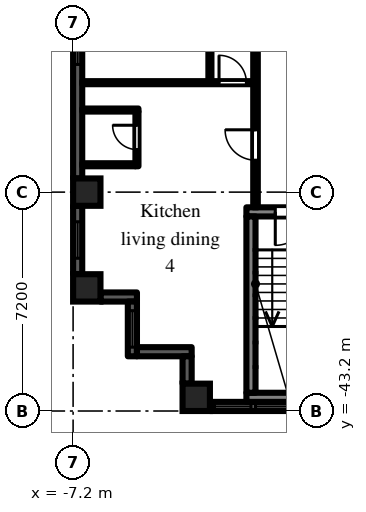
"""IFC4 building model, lengths in metres.
Left out: names, types, materials, properties, quantities, classifications, styles, units other than length and angle.
Written with IfcOpenShell. Run it as: python <this file> out.ifc"""

import sys

from ifc_helpers import new_model, si_unit, direction, frame, frame_2d, origin, origin_2d, place, context, subcontext, project, spatial, rectangle, extrude, element, fill, save


model = new_model("IFC4")
c1 = context("Model", 3, precision=1e-05, world=origin(), true_north=direction((0.0, 1.0)))
c2 = subcontext(c1, "Body", "Model", "MODEL_VIEW")
j1 = project(units=[si_unit("LENGTHUNIT", "METRE"), si_unit("PLANEANGLEUNIT", "RADIAN")], contexts=[c1])
p1 = place(None, origin())
s1 = spatial("IfcSite", under=j1, at=p1, CompositionType="ELEMENT")
p2 = place(p1, origin())
s2 = spatial("IfcBuilding", under=s1, at=p2, CompositionType="ELEMENT")
p3 = place(p2, frame((0.0, 0.0, 29.7)))
s3 = spatial("IfcBuildingStorey", under=s2, at=p3, CompositionType="ELEMENT", Elevation=29.7)
for number, where, z_axis, x_axis in (
    (1, (-6.75, -39.15, 0.0), (0.0, 0.0, 1.0), (1.0, 0.0, 0.0)),
    (2, (-6.75, -36.0, 0.0), (0.0, 0.0, 1.0), (1.0, 0.0, 0.0)),
    (3, (-3.15, -42.75, 0.0), (0.0, 0.0, 1.0), (1.0, 0.0, 0.0)),
):
    element("IfcColumn", number, at=place(p3, frame(where, z_axis=z_axis, x_axis=x_axis)), inside=s3, PredefinedType="COLUMN", context=c2, shape_type="SweptSolid", body=[
        extrude(rectangle(XDim=0.9, YDim=0.9, at=origin_2d()), origin(), (0.0, 0.0, 1.0), 3.0),
    ])
p4 = place(p3, frame((-7.05, -29.25, 0.0), z_axis=(0.0, 0.0, 1.0), x_axis=(0.0, -1.0, 0.0)))
e4 = element("IfcWall", 4, at=p4, inside=s3, PredefinedType="SOLIDWALL", context=c2, shape_type="SweptSolid", body=[
    extrude(rectangle(XDim=6.3, YDim=0.3, at=frame_2d((3.15, 0.0))), origin(), (0.0, 0.0, 1.0), 2.1),
])
p5 = place(p4, frame((0.15, 0.0, 0.2)))
e5 = element("IfcOpeningElement", 5, at=p5, cuts=e4, PredefinedType="OPENING", context=c2, shape_type="SweptSolid", body=[
    extrude(rectangle(XDim=2.4, YDim=1.85, at=frame_2d((1.2, 0.925))), frame((0.0, 0.16, 0.0), z_axis=(0.0, -1.0, 0.0), x_axis=(1.0, 0.0, 0.0)), (0.0, 0.0, 1.0), 0.32),
])
p6 = place(p3, frame((-7.05, -36.45, 0.0), z_axis=(0.0, 0.0, 1.0), x_axis=(0.0, -1.0, 0.0)))
e6 = element("IfcWall", 6, at=p6, inside=s3, PredefinedType="SOLIDWALL", context=c2, shape_type="SweptSolid", body=[
    extrude(rectangle(XDim=2.25, YDim=0.3, at=frame_2d((1.125, 0.0))), origin(), (0.0, 0.0, 1.0), 2.1),
])
p7 = place(p6, frame((0.525, 0.0, 0.2)))
e7 = element("IfcOpeningElement", 7, at=p7, cuts=e6, PredefinedType="OPENING", context=c2, shape_type="SweptSolid", body=[
    extrude(rectangle(XDim=1.2, YDim=1.85, at=frame_2d((0.6, 0.925))), frame((0.0, 0.16, 0.0), z_axis=(0.0, -1.0, 0.0), x_axis=(1.0, 0.0, 0.0)), (0.0, 0.0, 1.0), 0.32),
])
p8 = place(p3, frame((-6.3, -39.45, 0.0), z_axis=(0.0, 0.0, 1.0), x_axis=(1.0, 0.0, 0.0)))
e8 = element("IfcWall", 8, at=p8, inside=s3, PredefinedType="SOLIDWALL", context=c2, shape_type="SweptSolid", body=[
    extrude(rectangle(XDim=1.2, YDim=0.3, at=frame_2d((0.6, 0.0))), origin(), (0.0, 0.0, 1.0), 2.575),
])
p9 = place(p3, frame((-5.25, -39.6, 0.0), z_axis=(0.0, 0.0, 1.0), x_axis=(0.0, -1.0, 0.0)))
e9 = element("IfcWall", 9, at=p9, inside=s3, PredefinedType="SOLIDWALL", context=c2, shape_type="SweptSolid", body=[
    extrude(rectangle(XDim=1.8, YDim=0.3, at=frame_2d((0.9, 0.0))), origin(), (0.0, 0.0, 1.0), 2.575),
])
p10 = place(p9, frame((0.3, 0.0, 0.2)))
e10 = element("IfcOpeningElement", 10, at=p10, cuts=e9, PredefinedType="OPENING", context=c2, shape_type="SweptSolid", body=[
    extrude(rectangle(XDim=1.2, YDim=1.85, at=frame_2d((0.6, 0.925))), frame((0.0, 0.16, 0.0), z_axis=(0.0, -1.0, 0.0), x_axis=(1.0, 0.0, 0.0)), (0.0, 0.0, 1.0), 0.32),
])
p11 = place(p3, frame((-5.1, -41.25, 0.0), z_axis=(0.0, 0.0, 1.0), x_axis=(1.0, 0.0, 0.0)))
e11 = element("IfcWall", 11, at=p11, inside=s3, PredefinedType="SOLIDWALL", context=c2, shape_type="SweptSolid", body=[
    extrude(rectangle(XDim=1.8, YDim=0.3, at=frame_2d((0.9, 0.0))), origin(), (0.0, 0.0, 1.0), 2.575),
])
p12 = place(p3, frame((-3.45, -41.4, 0.0), z_axis=(0.0, 0.0, 1.0), x_axis=(0.0, -1.0, 0.0)))
e12 = element("IfcWall", 12, at=p12, inside=s3, PredefinedType="SOLIDWALL", context=c2, shape_type="SweptSolid", body=[
    extrude(rectangle(XDim=0.9, YDim=0.3, at=frame_2d((0.45, 0.0))), origin(), (0.0, 0.0, 1.0), 2.575),
])
p13 = place(p3, frame((-2.7, -43.05, 0.0), z_axis=(0.0, 0.0, 1.0), x_axis=(1.0, 0.0, 0.0)))
e13 = element("IfcWall", 13, at=p13, inside=s3, PredefinedType="SOLIDWALL", context=c2, shape_type="SweptSolid", body=[
    extrude(rectangle(XDim=5.4, YDim=0.3, at=frame_2d((2.7, 0.0))), origin(), (0.0, 0.0, 1.0), 2.1),
])
p14 = place(p13, frame((1.5, 0.0, 0.2)))
e14 = element("IfcOpeningElement", 14, at=p14, cuts=e13, PredefinedType="OPENING", context=c2, shape_type="SweptSolid", body=[
    extrude(rectangle(XDim=2.4, YDim=1.85, at=frame_2d((1.2, 0.925))), frame((0.0, 0.16, 0.0), z_axis=(0.0, -1.0, 0.0), x_axis=(1.0, 0.0, 0.0)), (0.0, 0.0, 1.0), 0.32),
])
p15 = place(p13, frame((0.15, 0.0, 0.2)))
e15 = element("IfcOpeningElement", 15, at=p15, cuts=e13, PredefinedType="OPENING", context=c2, shape_type="SweptSolid", body=[
    extrude(rectangle(XDim=1.2, YDim=1.85, at=frame_2d((0.6, 0.925))), frame((0.0, 0.16, 0.0), z_axis=(0.0, -1.0, 0.0), x_axis=(1.0, 0.0, 0.0)), (0.0, 0.0, 1.0), 0.32),
])
p16 = place(p13, frame((4.05, 0.0, 0.2)))
e16 = element("IfcOpeningElement", 16, at=p16, cuts=e13, PredefinedType="OPENING", context=c2, shape_type="SweptSolid", body=[
    extrude(rectangle(XDim=1.2, YDim=1.85, at=frame_2d((0.6, 0.925))), frame((0.0, 0.16, 0.0), z_axis=(0.0, -1.0, 0.0), x_axis=(1.0, 0.0, 0.0)), (0.0, 0.0, 1.0), 0.32),
])
p17 = place(p3, frame((-1.5, -36.65, 0.0), z_axis=(0.0, 0.0, 1.0), x_axis=(1.0, 0.0, 0.0)))
e17 = element("IfcWall", 17, at=p17, inside=s3, PredefinedType="SHEAR", context=c2, shape_type="SweptSolid", body=[
    extrude(rectangle(XDim=3.0, YDim=0.3, at=frame_2d((1.5, 0.0))), origin(), (0.0, 0.0, 1.0), 2.575),
])
p18 = place(p17, frame((0.95, 0.0, 0.0)))
e18 = element("IfcOpeningElement", 18, at=p18, cuts=e17, PredefinedType="OPENING", context=c2, shape_type="SweptSolid", body=[
    extrude(rectangle(XDim=1.1, YDim=2.1, at=frame_2d((0.55, 1.05))), frame((0.0, 0.16, 0.0), z_axis=(0.0, -1.0, 0.0), x_axis=(1.0, 0.0, 0.0)), (0.0, 0.0, 1.0), 0.32),
])
p19 = place(p3, frame((-1.5, -42.75, 0.0), z_axis=(0.0, 0.0, 1.0), x_axis=(1.0, 0.0, 0.0)))
e19 = element("IfcWall", 19, at=p19, inside=s3, PredefinedType="SHEAR", context=c2, shape_type="SweptSolid", body=[
    extrude(rectangle(XDim=3.0, YDim=0.3, at=frame_2d((1.5, 0.0))), origin(), (0.0, 0.0, 1.0), 2.575),
])
p20 = place(p3, frame((-1.35, -36.8, 0.0), z_axis=(0.0, 0.0, 1.0), x_axis=(0.0, -1.0, 0.0)))
e20 = element("IfcWall", 20, at=p20, inside=s3, PredefinedType="SHEAR", context=c2, shape_type="SweptSolid", body=[
    extrude(rectangle(XDim=5.8, YDim=0.3, at=frame_2d((2.9, 0.0))), origin(), (0.0, 0.0, 1.0), 2.575),
])
p21 = place(p3, frame((-6.9, -35.1, 0.0), z_axis=(0.0, 0.0, 1.0), x_axis=(1.0, 0.0, 0.0)))
e21 = element("IfcWall", 21, at=p21, inside=s3, PredefinedType="PARTITIONING", context=c2, shape_type="SweptSolid", body=[
    extrude(rectangle(XDim=1.75, YDim=0.1, at=frame_2d((0.875, 0.0))), origin(), (0.0, 0.0, 1.0), 2.575),
])
p22 = place(p3, frame((-6.9, -33.3, 0.0), z_axis=(0.0, 0.0, 1.0), x_axis=(1.0, 0.0, 0.0)))
e22 = element("IfcWall", 22, at=p22, inside=s3, PredefinedType="PARTITIONING", context=c2, shape_type="SweptSolid", body=[
    extrude(rectangle(XDim=1.85, YDim=0.1, at=frame_2d((0.925, 0.0))), origin(), (0.0, 0.0, 1.0), 2.575),
])
p23 = place(p3, frame((-6.9, -32.4, 0.0), z_axis=(0.0, 0.0, 1.0), x_axis=(1.0, 0.0, 0.0)))
e23 = element("IfcWall", 23, at=p23, inside=s3, PredefinedType="PARTITIONING", context=c2, shape_type="SweptSolid", body=[
    extrude(rectangle(XDim=5.625, YDim=0.1, at=frame_2d((2.812, 0.0))), origin(), (0.0, 0.0, 1.0), 2.575),
])
p24 = place(p23, frame((4.5, 0.0, 0.0)))
e24 = element("IfcOpeningElement", 24, at=p24, cuts=e23, PredefinedType="OPENING", context=c2, shape_type="SweptSolid", body=[
    extrude(rectangle(XDim=0.9, YDim=2.1, at=frame_2d((0.45, 1.05))), frame((0.0, 0.06, 0.0), z_axis=(0.0, -1.0, 0.0), x_axis=(1.0, 0.0, 0.0)), (0.0, 0.0, 1.0), 0.12),
])
p25 = place(p3, frame((-5.1, -35.15, 0.0), z_axis=(0.0, 0.0, 1.0), x_axis=(0.0, 1.0, 0.0)))
e25 = element("IfcWall", 25, at=p25, inside=s3, PredefinedType="PARTITIONING", context=c2, shape_type="SweptSolid", body=[
    extrude(rectangle(XDim=1.8, YDim=0.1, at=frame_2d((0.9, 0.0))), origin(), (0.0, 0.0, 1.0), 2.575),
])
p26 = place(p25, frame((0.55, 0.0, 0.0)))
e26 = element("IfcOpeningElement", 26, at=p26, cuts=e25, PredefinedType="OPENING", context=c2, shape_type="SweptSolid", body=[
    extrude(rectangle(XDim=0.8, YDim=2.1, at=frame_2d((0.4, 1.05))), frame((0.0, 0.06, 0.0), z_axis=(0.0, -1.0, 0.0), x_axis=(1.0, 0.0, 0.0)), (0.0, 0.0, 1.0), 0.12),
])
p27 = place(p3, frame((-2.7, -32.35, 0.0), z_axis=(0.0, 0.0, 1.0), x_axis=(0.0, 1.0, 0.0)))
e27 = element("IfcWall", 27, at=p27, inside=s3, PredefinedType="PARTITIONING", context=c2, shape_type="SweptSolid", body=[
    extrude(rectangle(XDim=14.25, YDim=0.1, at=frame_2d((7.125, 0.0))), origin(), (0.0, 0.0, 1.0), 2.575),
])
p28 = place(p27, frame((3.28, 0.0, 0.0)))
e28 = element("IfcOpeningElement", 28, at=p28, cuts=e27, PredefinedType="OPENING", context=c2, shape_type="SweptSolid", body=[
    extrude(rectangle(XDim=0.9, YDim=2.1, at=frame_2d((0.45, 1.05))), frame((0.0, 0.06, 0.0), z_axis=(0.0, -1.0, 0.0), x_axis=(1.0, 0.0, 0.0)), (0.0, 0.0, 1.0), 0.12),
])
p29 = place(p27, frame((10.12, 0.0, 0.0)))
e29 = element("IfcOpeningElement", 29, at=p29, cuts=e27, PredefinedType="OPENING", context=c2, shape_type="SweptSolid", body=[
    extrude(rectangle(XDim=0.9, YDim=2.1, at=frame_2d((0.45, 1.05))), frame((0.0, 0.06, 0.0), z_axis=(0.0, -1.0, 0.0), x_axis=(1.0, 0.0, 0.0)), (0.0, 0.0, 1.0), 0.12),
])
p30 = place(p3, frame((-1.2, -36.5, 0.0), z_axis=(0.0, 0.0, 1.0), x_axis=(0.0, 1.0, 0.0)))
e30 = element("IfcWall", 30, at=p30, inside=s3, PredefinedType="PARTITIONING", context=c2, shape_type="SweptSolid", body=[
    extrude(rectangle(XDim=35.375, YDim=0.15, at=frame_2d((17.688, 0.0))), origin(), (0.0, 0.0, 1.0), 2.575),
])
p31 = place(p30, frame((33.65, 0.0, 0.0)))
e31 = element("IfcOpeningElement", 31, at=p31, cuts=e30, PredefinedType="OPENING", context=c2, shape_type="SweptSolid", body=[
    extrude(rectangle(XDim=0.9, YDim=2.1, at=frame_2d((0.45, 1.05))), frame((0.0, 0.085, 0.0), z_axis=(0.0, -1.0, 0.0), x_axis=(1.0, 0.0, 0.0)), (0.0, 0.0, 1.0), 0.17),
])
p32 = place(p30, frame((30.65, 0.0, 0.0)))
e32 = element("IfcOpeningElement", 32, at=p32, cuts=e30, PredefinedType="OPENING", context=c2, shape_type="SweptSolid", body=[
    extrude(rectangle(XDim=0.9, YDim=2.1, at=frame_2d((0.45, 1.05))), frame((0.0, 0.085, 0.0), z_axis=(0.0, -1.0, 0.0), x_axis=(1.0, 0.0, 0.0)), (0.0, 0.0, 1.0), 0.17),
])
p33 = place(p30, frame((27.05, 0.0, 0.0)))
e33 = element("IfcOpeningElement", 33, at=p33, cuts=e30, PredefinedType="OPENING", context=c2, shape_type="SweptSolid", body=[
    extrude(rectangle(XDim=0.9, YDim=2.1, at=frame_2d((0.45, 1.05))), frame((0.0, 0.085, 0.0), z_axis=(0.0, -1.0, 0.0), x_axis=(1.0, 0.0, 0.0)), (0.0, 0.0, 1.0), 0.17),
])
p34 = place(p30, frame((20.9, 0.0, 0.0)))
e34 = element("IfcOpeningElement", 34, at=p34, cuts=e30, PredefinedType="OPENING", context=c2, shape_type="SweptSolid", body=[
    extrude(rectangle(XDim=1.0, YDim=2.1, at=frame_2d((0.5, 1.05))), frame((0.0, 0.085, 0.0), z_axis=(0.0, -1.0, 0.0), x_axis=(1.0, 0.0, 0.0)), (0.0, 0.0, 1.0), 0.17),
])
p35 = place(p30, frame((1.55, 0.0, 0.0)))
e35 = element("IfcOpeningElement", 35, at=p35, cuts=e30, PredefinedType="OPENING", context=c2, shape_type="SweptSolid", body=[
    extrude(rectangle(XDim=1.0, YDim=2.1, at=frame_2d((0.5, 1.05))), frame((0.0, 0.085, 0.0), z_axis=(0.0, -1.0, 0.0), x_axis=(1.0, 0.0, 0.0)), (0.0, 0.0, 1.0), 0.17),
])
p36 = place(p5, origin())
e36 = element("IfcWindow", 36, at=p36, inside=s3, PartitioningType="SINGLE_PANEL", PredefinedType="WINDOW", context=c2, shape_type="SweptSolid", body=[
    extrude(rectangle(XDim=2.4, YDim=1.85, at=frame_2d((1.2, 0.925))), frame((0.0, 0.03, 0.0), z_axis=(0.0, -1.0, 0.0), x_axis=(1.0, 0.0, 0.0)), (0.0, 0.0, 1.0), 0.06),
])
fill(e5, e36)
p37 = place(p7, origin())
e37 = element("IfcWindow", 37, at=p37, inside=s3, PartitioningType="SINGLE_PANEL", PredefinedType="WINDOW", context=c2, shape_type="SweptSolid", body=[
    extrude(rectangle(XDim=1.2, YDim=1.85, at=frame_2d((0.6, 0.925))), frame((0.0, 0.03, 0.0), z_axis=(0.0, -1.0, 0.0), x_axis=(1.0, 0.0, 0.0)), (0.0, 0.0, 1.0), 0.06),
])
fill(e7, e37)
p38 = place(p10, origin())
e38 = element("IfcWindow", 38, at=p38, inside=s3, PartitioningType="SINGLE_PANEL", PredefinedType="WINDOW", context=c2, shape_type="SweptSolid", body=[
    extrude(rectangle(XDim=1.2, YDim=1.85, at=frame_2d((0.6, 0.925))), frame((0.0, 0.03, 0.0), z_axis=(0.0, -1.0, 0.0), x_axis=(1.0, 0.0, 0.0)), (0.0, 0.0, 1.0), 0.06),
])
fill(e10, e38)
p39 = place(p14, origin())
e39 = element("IfcWindow", 39, at=p39, inside=s3, PartitioningType="SINGLE_PANEL", PredefinedType="WINDOW", context=c2, shape_type="SweptSolid", body=[
    extrude(rectangle(XDim=2.4, YDim=1.85, at=frame_2d((1.2, 0.925))), frame((0.0, 0.03, 0.0), z_axis=(0.0, -1.0, 0.0), x_axis=(1.0, 0.0, 0.0)), (0.0, 0.0, 1.0), 0.06),
])
fill(e14, e39)
p40 = place(p15, origin())
e40 = element("IfcWindow", 40, at=p40, inside=s3, PartitioningType="SINGLE_PANEL", PredefinedType="WINDOW", context=c2, shape_type="SweptSolid", body=[
    extrude(rectangle(XDim=1.2, YDim=1.85, at=frame_2d((0.6, 0.925))), frame((0.0, 0.03, 0.0), z_axis=(0.0, -1.0, 0.0), x_axis=(1.0, 0.0, 0.0)), (0.0, 0.0, 1.0), 0.06),
])
fill(e15, e40)
p41 = place(p18, frame((1.1, 0.0, 0.0), z_axis=(0.0, 0.0, 1.0), x_axis=(-1.0, 0.0, 0.0)))
e41 = element("IfcDoor", 41, at=p41, inside=s3, OperationType="SINGLE_SWING_RIGHT", PredefinedType="DOOR", context=c2, shape_type="SweptSolid", body=[
    extrude(rectangle(XDim=1.1, YDim=2.1, at=frame_2d((0.55, 1.05))), frame((0.0, 0.025, 0.0), z_axis=(0.0, -1.0, 0.0), x_axis=(1.0, 0.0, 0.0)), (0.0, 0.0, 1.0), 0.05),
])
fill(e18, e41)
p42 = place(p26, origin())
e42 = element("IfcDoor", 42, at=p42, inside=s3, OperationType="SINGLE_SWING_RIGHT", PredefinedType="DOOR", context=c2, shape_type="SweptSolid", body=[
    extrude(rectangle(XDim=0.8, YDim=2.1, at=frame_2d((0.4, 1.05))), frame((0.0, 0.025, 0.0), z_axis=(0.0, -1.0, 0.0), x_axis=(1.0, 0.0, 0.0)), (0.0, 0.0, 1.0), 0.05),
])
fill(e26, e42)
p43 = place(p35, origin())
e43 = element("IfcDoor", 43, at=p43, inside=s3, OperationType="SINGLE_SWING_RIGHT", PredefinedType="DOOR", context=c2, shape_type="SweptSolid", body=[
    extrude(rectangle(XDim=1.0, YDim=2.1, at=frame_2d((0.5, 1.05))), frame((0.0, 0.025, 0.0), z_axis=(0.0, -1.0, 0.0), x_axis=(1.0, 0.0, 0.0)), (0.0, 0.0, 1.0), 0.05),
])
fill(e35, e43)
p44 = place(p24, origin())
e44 = element("IfcDoor", 44, at=p44, inside=s3, OperationType="SINGLE_SWING_LEFT", PredefinedType="DOOR", context=c2, shape_type="SweptSolid", body=[
    extrude(rectangle(XDim=0.9, YDim=2.1, at=frame_2d((0.45, 1.05))), frame((0.0, 0.025, 0.0), z_axis=(0.0, -1.0, 0.0), x_axis=(1.0, 0.0, 0.0)), (0.0, 0.0, 1.0), 0.05),
])
fill(e24, e44)
save(model, sys.argv[1])
